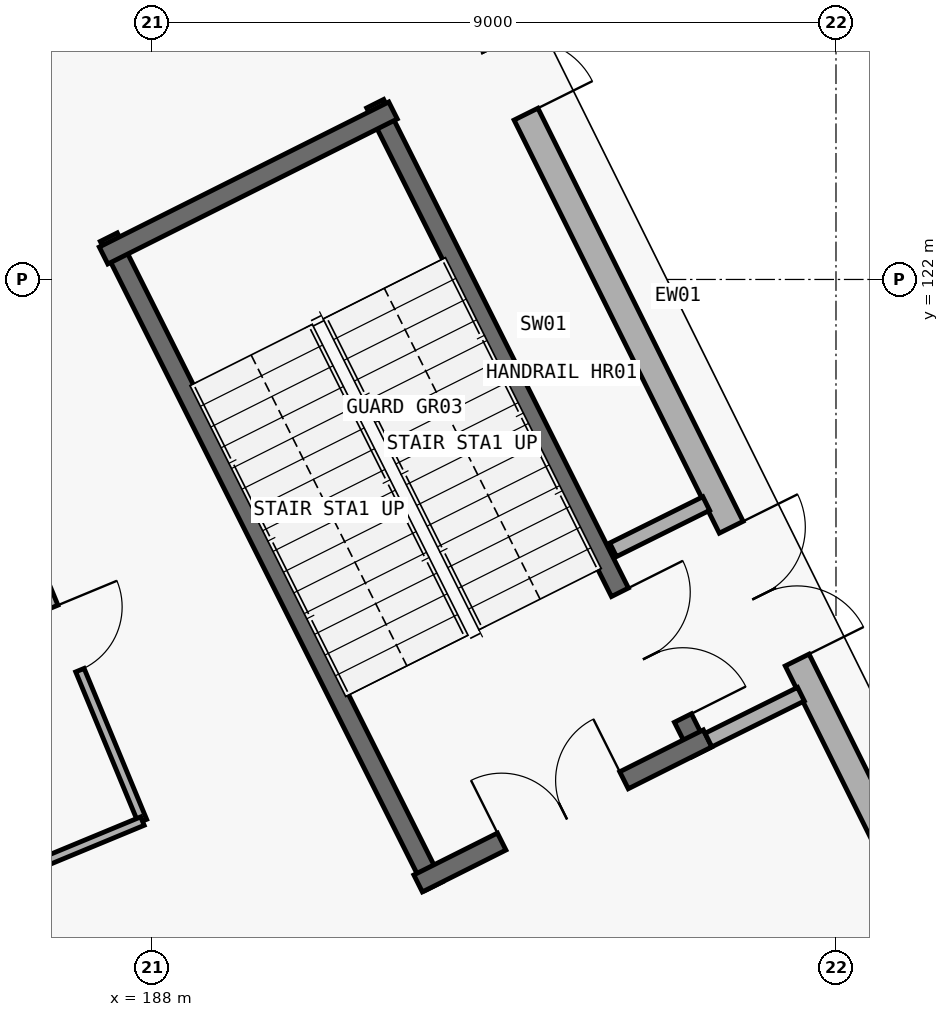
"""IFC4 building model, lengths in metres.
Left out: names, types, materials, properties, quantities, classifications, styles, units other than length and angle.
Written with IfcOpenShell. Run it as: python <this file> out.ifc"""

import sys

from ifc_helpers import new_model, si_unit, direction, frame, frame_2d, origin, place, context, subcontext, project, spatial, rectangle, extrude, element, fill, save


model = new_model("IFC4")
c1 = context("Model", 3, precision=1e-05, world=origin(), true_north=direction((0.0, 1.0)))
c2 = subcontext(c1, "Body", "Model", "MODEL_VIEW")
j1 = project(units=[si_unit("LENGTHUNIT", "METRE"), si_unit("PLANEANGLEUNIT", "RADIAN")], contexts=[c1])
p1 = place(None, origin())
s1 = spatial("IfcSite", under=j1, at=p1, CompositionType="ELEMENT")
p2 = place(p1, origin())
s2 = spatial("IfcBuilding", under=s1, at=p2, CompositionType="ELEMENT")
p3 = place(p2, origin())
s3 = spatial("IfcBuildingStorey", under=s2, at=p3, CompositionType="ELEMENT", Elevation=0.0)
p4 = place(p3, frame((190.436, 129.179, 0.0), z_axis=(0.0, 0.0, 1.0), x_axis=(0.444884558919, -0.895587923788, 0.0)))
e1 = element("IfcWall", 1, at=p4, inside=s3, PredefinedType="STANDARD", context=c2, shape_type="SweptSolid", body=[
    extrude(rectangle(XDim=19.216, YDim=0.35, at=frame_2d((9.608, 0.0))), origin(), (0.0, 0.0, 1.0), 4.165),
])
p5 = place(p4, frame((11.656, 0.0, 0.0)))
e2 = element("IfcOpeningElement", 2, at=p5, cuts=e1, PredefinedType="OPENING", context=c2, shape_type="SweptSolid", body=[
    extrude(rectangle(XDim=1.95, YDim=2.25, at=frame_2d((0.975, 1.125))), frame((0.0, 0.185, 0.0), z_axis=(0.0, -1.0, 0.0), x_axis=(1.0, 0.0, 0.0)), (0.0, 0.0, 1.0), 0.37),
])
p6 = place(p4, frame((3.637, 0.0, 0.0)))
e3 = element("IfcOpeningElement", 3, at=p6, cuts=e1, PredefinedType="OPENING", context=c2, shape_type="SweptSolid", body=[
    extrude(rectangle(XDim=1.95, YDim=2.25, at=frame_2d((0.975, 1.125))), frame((0.0, 0.185, 0.0), z_axis=(0.0, -1.0, 0.0), x_axis=(1.0, 0.0, 0.0)), (0.0, 0.0, 1.0), 0.37),
])
p7 = place(p3, frame((190.937, 124.313, 0.0), z_axis=(0.0, 0.0, 1.0), x_axis=(0.447919041961, -0.894074119885, 0.0)))
e4 = element("IfcWall", 4, at=p7, inside=s3, PredefinedType="SHEAR", context=c2, shape_type="SweptSolid", body=[
    extrude(rectangle(XDim=9.55, YDim=0.25, at=frame_2d((4.775, 0.0))), origin(), (0.0, 0.0, 1.0), 5.1),
])
p8 = place(p7, frame((7.19, 0.0, 0.0)))
e5 = element("IfcOpeningElement", 5, at=p8, cuts=e4, PredefinedType="OPENING", context=c2, shape_type="SweptSolid", body=[
    extrude(rectangle(XDim=1.85, YDim=2.3, at=frame_2d((0.925, 1.15))), frame((0.0, 0.135, 0.0), z_axis=(0.0, -1.0, 0.0), x_axis=(1.0, 0.0, 0.0)), (0.0, 0.0, 1.0), 0.27),
])
p9 = place(p3, frame((187.432, 122.557, 0.0), z_axis=(0.0, 0.0, 1.0), x_axis=(0.447919041961, -0.894074119885, 0.0)))
e6 = element("IfcWall", 6, at=p9, inside=s3, PredefinedType="SHEAR", context=c2, shape_type="SweptSolid", body=[
    extrude(rectangle(XDim=9.55, YDim=0.25, at=frame_2d((4.775, 0.0))), origin(), (0.0, 0.0, 1.0), 5.1),
])
p10 = place(p3, frame((191.502, 114.054, 0.0), z_axis=(0.0, 0.0, 1.0), x_axis=(0.89409454548, 0.447878268888, 0.0)))
e7 = element("IfcWall", 7, at=p10, inside=s3, PredefinedType="SHEAR", context=c2, shape_type="SweptSolid", body=[
    extrude(rectangle(XDim=4.26, YDim=0.25, at=frame_2d((2.13, 0.0))), origin(), (0.0, 0.0, 1.0), 5.1),
])
p11 = place(p10, frame((1.23, 0.0, 0.0)))
e8 = element("IfcOpeningElement", 8, at=p11, cuts=e7, PredefinedType="OPENING", context=c2, shape_type="SweptSolid", body=[
    extrude(rectangle(XDim=1.8, YDim=2.25, at=frame_2d((0.9, 1.125))), frame((0.0, 0.135, 0.0), z_axis=(0.0, -1.0, 0.0), x_axis=(1.0, 0.0, 0.0)), (0.0, 0.0, 1.0), 0.27),
])
p12 = place(p3, frame((191.172, 124.223, 0.0), z_axis=(0.0, 0.0, 1.0), x_axis=(-0.89409454548, -0.447878268888, 0.0)))
e9 = element("IfcWall", 9, at=p12, inside=s3, PredefinedType="SHEAR", context=c2, shape_type="SweptSolid", body=[
    extrude(rectangle(XDim=4.26, YDim=0.25, at=frame_2d((2.13, 0.0))), origin(), (0.0, 0.0, 1.0), 5.1),
])
p13 = place(p3, frame((195.322, 115.94, 0.0), z_axis=(0.0, 0.0, 1.0), x_axis=(0.895788443733, 0.444480667829, 0.0)))
e10 = element("IfcWall", 10, at=p13, inside=s3, PredefinedType="PARTITIONING", context=c2, shape_type="SweptSolid", body=[
    extrude(rectangle(XDim=1.359, YDim=0.2, at=frame_2d((0.679, 0.0))), origin(), (0.0, 0.0, 1.0), 4.165),
])
p14 = place(p3, frame((194.068, 118.443, 0.0), z_axis=(0.0, 0.0, 1.0), x_axis=(0.895601808574, 0.44485660665, 0.0)))
e11 = element("IfcWall", 11, at=p14, inside=s3, PredefinedType="PARTITIONING", context=c2, shape_type="SweptSolid", body=[
    extrude(rectangle(XDim=1.368, YDim=0.2, at=frame_2d((0.684, 0.0))), origin(), (0.0, 0.0, 1.0), 4.165),
])
p15 = place(p3, frame((185.885, 119.678, 0.0), z_axis=(0.0, 0.0, 1.0), x_axis=(0.382704261034, -0.923870904719, 0.0)))
e12 = element("IfcWall", 12, at=p15, inside=s3, PredefinedType="PARTITIONING", context=c2, shape_type="SweptSolid", body=[
    extrude(rectangle(XDim=5.2, YDim=0.12, at=frame_2d((2.6, 0.0))), origin(), (0.0, 0.0, 1.0), 4.415),
])
p16 = place(p15, frame((2.15, 0.0, 0.0)))
e13 = element("IfcOpeningElement", 13, at=p16, cuts=e12, PredefinedType="OPENING", context=c2, shape_type="SweptSolid", body=[
    extrude(rectangle(XDim=0.9, YDim=2.1, at=frame_2d((0.45, 1.05))), frame((0.0, 0.07, 0.0), z_axis=(0.0, -1.0, 0.0), x_axis=(1.0, 0.0, 0.0)), (0.0, 0.0, 1.0), 0.14),
])
p17 = place(p3, frame((187.875, 114.874, 0.0), z_axis=(0.0, 0.0, 1.0), x_axis=(-0.923879927009, -0.382682479961, 0.0)))
e14 = element("IfcWall", 14, at=p17, inside=s3, PredefinedType="PARTITIONING", context=c2, shape_type="SweptSolid", body=[
    extrude(rectangle(XDim=3.499, YDim=0.12, at=frame_2d((1.75, 0.0))), origin(), (0.0, 0.0, 1.0), 4.617),
])
p18 = place(p5, origin())
e15 = element("IfcDoor", 15, at=p18, inside=s3, OperationType="DOUBLE_DOOR_SINGLE_SWING", PredefinedType="DOOR", context=c2, shape_type="SweptSolid", body=[
    extrude(rectangle(XDim=1.95, YDim=2.25, at=frame_2d((0.975, 1.125))), frame((0.0, 0.025, 0.0), z_axis=(0.0, -1.0, 0.0), x_axis=(1.0, 0.0, 0.0)), (0.0, 0.0, 1.0), 0.05),
])
fill(e2, e15)
p19 = place(p6, origin())
e16 = element("IfcDoor", 16, at=p19, inside=s3, OperationType="DOUBLE_DOOR_SINGLE_SWING", PredefinedType="DOOR", context=c2, shape_type="SweptSolid", body=[
    extrude(rectangle(XDim=1.95, YDim=2.25, at=frame_2d((0.975, 1.125))), frame((0.0, 0.025, 0.0), z_axis=(0.0, -1.0, 0.0), x_axis=(1.0, 0.0, 0.0)), (0.0, 0.0, 1.0), 0.05),
])
fill(e3, e16)
p20 = place(p11, origin())
e17 = element("IfcDoor", 17, at=p20, inside=s3, OperationType="DOUBLE_DOOR_SINGLE_SWING", PredefinedType="DOOR", context=c2, shape_type="SweptSolid", body=[
    extrude(rectangle(XDim=1.8, YDim=2.25, at=frame_2d((0.9, 1.125))), frame((0.0, 0.025, 0.0), z_axis=(0.0, -1.0, 0.0), x_axis=(1.0, 0.0, 0.0)), (0.0, 0.0, 1.0), 0.05),
])
fill(e8, e17)
p21 = place(p8, origin())
e18 = element("IfcDoor", 18, at=p21, inside=s3, OperationType="DOUBLE_DOOR_SINGLE_SWING", PredefinedType="DOOR", context=c2, shape_type="SweptSolid", body=[
    extrude(rectangle(XDim=1.85, YDim=2.3, at=frame_2d((0.925, 1.15))), frame((0.0, 0.025, 0.0), z_axis=(0.0, -1.0, 0.0), x_axis=(1.0, 0.0, 0.0)), (0.0, 0.0, 1.0), 0.05),
])
fill(e5, e18)
p22 = place(p16, origin())
e19 = element("IfcDoor", 19, at=p22, inside=s3, OperationType="SINGLE_SWING_LEFT", PredefinedType="DOOR", context=c2, shape_type="SweptSolid", body=[
    extrude(rectangle(XDim=0.9, YDim=2.1, at=frame_2d((0.45, 1.05))), frame((0.0, 0.025, 0.0), z_axis=(0.0, -1.0, 0.0), x_axis=(1.0, 0.0, 0.0)), (0.0, 0.0, 1.0), 0.05),
])
fill(e13, e19)
save(model, sys.argv[1])
